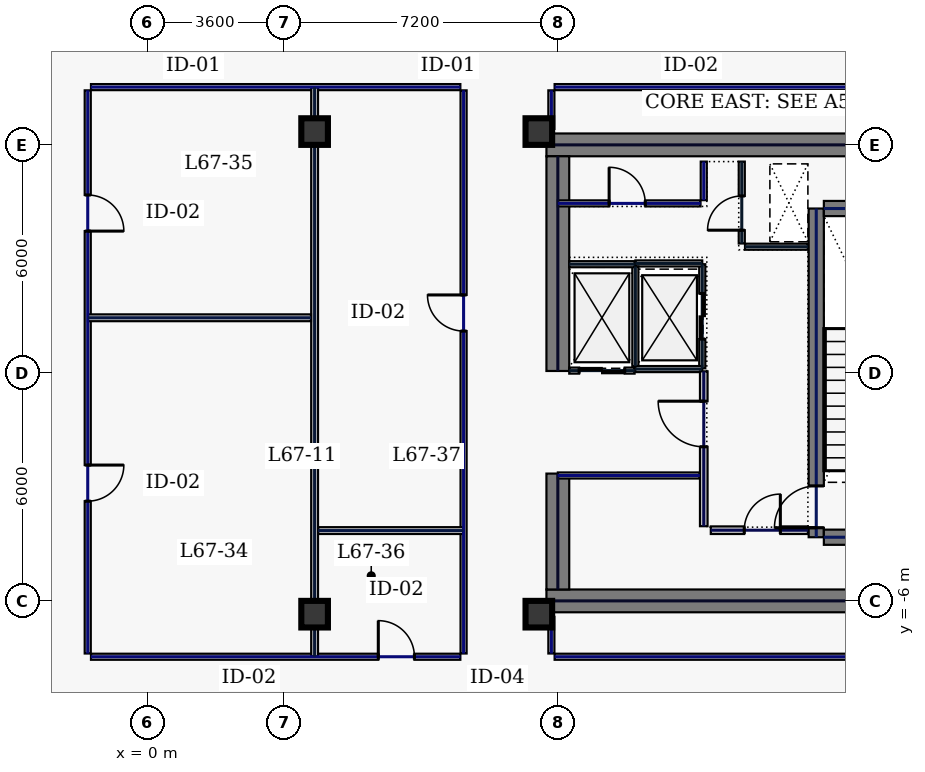
"""IFC4 building model, lengths in metres.
Left out: names, types, materials, properties, quantities, classifications, styles, units other than length and angle.
Written with IfcOpenShell. Run it as: python <this file> out.ifc"""

import sys

from ifc_helpers import new_model, si_unit, direction, frame, frame_2d, origin, origin_2d, place, context, subcontext, project, spatial, rectangle, hollow_rectangle, extrude, element, fill, save


model = new_model("IFC4")
c1 = context("Model", 3, precision=1e-05, world=origin(), true_north=direction((0.0, 1.0)))
c2 = subcontext(c1, "Body", "Model", "MODEL_VIEW")
j1 = project(units=[si_unit("LENGTHUNIT", "METRE"), si_unit("PLANEANGLEUNIT", "RADIAN")], contexts=[c1])
p1 = place(None, origin())
s1 = spatial("IfcSite", under=j1, at=p1, CompositionType="ELEMENT")
p2 = place(p1, origin())
s2 = spatial("IfcBuilding", under=s1, at=p2, CompositionType="ELEMENT")
p3 = place(p2, frame((0.0, 0.0, 289.0)))
s3 = spatial("IfcBuildingStorey", under=s2, at=p3, CompositionType="ELEMENT", Elevation=289.0)
for number, where, z_axis, x_axis in (
    (1, (10.5, 6.0, 0.0), (0.0, 0.0, 1.0), (1.0, 0.0, 0.0)),
    (2, (10.5, -6.0, 0.0), (0.0, 0.0, 1.0), (1.0, 0.0, 0.0)),
):
    element("IfcWall", number, at=place(p3, frame(where, z_axis=z_axis, x_axis=x_axis)), inside=s3, PredefinedType="SHEAR", context=c2, shape_type="SweptSolid", body=[
        extrude(rectangle(XDim=11.5, YDim=0.6, at=frame_2d((5.75, 0.0))), origin(), (0.0, 0.0, 1.0), 3.74),
    ])
p4 = place(p3, frame((10.8, -5.7, 0.0), z_axis=(0.0, 0.0, 1.0), x_axis=(0.0, 1.0, 0.0)))
e3 = element("IfcWall", 3, at=p4, inside=s3, PredefinedType="SHEAR", context=c2, shape_type="SweptSolid", body=[
    extrude(rectangle(XDim=3.05, YDim=0.6, at=frame_2d((1.525, 0.0))), origin(), (0.0, 0.0, 1.0), 3.74),
])
p5 = place(p3, frame((10.8, 0.05, 0.0), z_axis=(0.0, 0.0, 1.0), x_axis=(0.0, 1.0, 0.0)))
e4 = element("IfcWall", 4, at=p5, inside=s3, PredefinedType="SHEAR", context=c2, shape_type="SweptSolid", body=[
    extrude(rectangle(XDim=5.65, YDim=0.6, at=frame_2d((2.825, 0.0))), origin(), (0.0, 0.0, 1.0), 3.74),
])
p6 = place(p3, frame((17.6, -4.325, 0.0), z_axis=(0.0, 0.0, 1.0), x_axis=(0.0, 1.0, 0.0)))
e5 = element("IfcWall", 5, at=p6, inside=s3, PredefinedType="SHEAR", context=c2, shape_type="SweptSolid", body=[
    extrude(rectangle(XDim=8.65, YDim=0.4, at=frame_2d((4.325, 0.0))), origin(), (0.0, 0.0, 1.0), 3.74),
])
p7 = place(p6, frame((0.25, 0.0, 0.0)))
e6 = element("IfcOpeningElement", 6, at=p7, cuts=e5, PredefinedType="OPENING", context=c2, shape_type="SweptSolid", body=[
    extrude(rectangle(XDim=1.1, YDim=2.2, at=frame_2d((0.55, 1.1))), frame((0.0, 0.21, 0.0), z_axis=(0.0, -1.0, 0.0), x_axis=(1.0, 0.0, 0.0)), (0.0, 0.0, 1.0), 0.42),
])
for number, where, z_axis, x_axis in (
    (7, (17.8, -4.325, 0.0), (0.0, 0.0, 1.0), (1.0, 0.0, 0.0)),
    (8, (17.8, 4.325, 0.0), (0.0, 0.0, 1.0), (1.0, 0.0, 0.0)),
):
    element("IfcWall", number, at=place(p3, frame(where, z_axis=z_axis, x_axis=x_axis)), inside=s3, PredefinedType="SHEAR", context=c2, shape_type="SweptSolid", body=[
        extrude(rectangle(XDim=3.4, YDim=0.4, at=frame_2d((1.7, 0.0))), origin(), (0.0, 0.0, 1.0), 3.74),
    ])
for number, where, z_axis, x_axis in (
    (9, (10.3, -6.35, 0.0), (0.0, 0.0, 1.0), (1.0, 0.0, 0.0)),
    (10, (10.3, 6.35, 0.0), (0.0, 0.0, 1.0), (1.0, 0.0, 0.0)),
    (11, (4.4, -6.35, 0.0), (0.0, 0.0, 1.0), (1.0, 0.0, 0.0)),
    (12, (4.4, 6.35, 0.0), (0.0, 0.0, 1.0), (1.0, 0.0, 0.0)),
):
    element("IfcColumn", number, at=place(p3, frame(where, z_axis=z_axis, x_axis=x_axis)), inside=s3, PredefinedType="COLUMN", context=c2, shape_type="SweptSolid", body=[
        extrude(hollow_rectangle(XDim=0.7, YDim=0.7, WallThickness=0.032, at=origin_2d()), origin(), (0.0, 0.0, 1.0), 3.74),
    ])
p8 = place(p3, frame((14.6, 0.12, 0.0), z_axis=(0.0, 0.0, 1.0), x_axis=(0.0, 1.0, 0.0)))
e13 = element("IfcWall", 13, at=p8, inside=s3, PredefinedType="PARTITIONING", context=c2, shape_type="SweptSolid", body=[
    extrude(rectangle(XDim=2.74, YDim=0.16, at=frame_2d((1.37, 0.0))), origin(), (0.0, 0.0, 1.0), 3.74),
])
p9 = place(p8, frame((0.77, 0.0, 0.0)))
e14 = element("IfcOpeningElement", 14, at=p9, cuts=e13, PredefinedType="OPENING", context=c2, shape_type="SweptSolid", body=[
    extrude(rectangle(XDim=1.2, YDim=2.2, at=frame_2d((0.6, 1.1))), frame((0.0, 0.09, 0.0), z_axis=(0.0, -1.0, 0.0), x_axis=(1.0, 0.0, 0.0)), (0.0, 0.0, 1.0), 0.18),
])
for number, where, z_axis, x_axis in (
    (15, (12.84, 0.1, 0.0), (0.0, 0.0, 1.0), (1.0, 0.0, 0.0)),
    (16, (12.84, 2.88, 0.0), (0.0, 0.0, 1.0), (1.0, 0.0, 0.0)),
):
    element("IfcWall", number, at=place(p3, frame(where, z_axis=z_axis, x_axis=x_axis)), inside=s3, PredefinedType="PARTITIONING", context=c2, shape_type="SweptSolid", body=[
        extrude(rectangle(XDim=1.76, YDim=0.16, at=frame_2d((0.88, 0.0))), origin(), (0.0, 0.0, 1.0), 3.74),
    ])
p10 = place(p3, frame((12.84, 0.18, 0.0), z_axis=(0.0, 0.0, 1.0), x_axis=(0.0, 1.0, 0.0)))
e17 = element("IfcWall", 17, at=p10, inside=s3, PredefinedType="PARTITIONING", context=c2, shape_type="SweptSolid", body=[
    extrude(rectangle(XDim=2.62, YDim=0.16, at=frame_2d((1.31, 0.0))), origin(), (0.0, 0.0, 1.0), 3.74),
])
p11 = place(p3, frame((11.1, 0.06, 0.0), z_axis=(0.0, 0.0, 1.0), x_axis=(1.0, 0.0, 0.0)))
e18 = element("IfcWall", 18, at=p11, inside=s3, PredefinedType="PARTITIONING", context=c2, shape_type="SweptSolid", body=[
    extrude(rectangle(XDim=1.72, YDim=0.16, at=frame_2d((0.86, 0.0))), origin(), (0.0, 0.0, 1.0), 3.74),
])
p12 = place(p11, frame((0.26, 0.0, 0.0)))
e19 = element("IfcOpeningElement", 19, at=p12, cuts=e18, PredefinedType="OPENING", context=c2, shape_type="SweptSolid", body=[
    extrude(rectangle(XDim=1.2, YDim=2.2, at=frame_2d((0.6, 1.1))), frame((0.0, 0.09, 0.0), z_axis=(0.0, -1.0, 0.0), x_axis=(1.0, 0.0, 0.0)), (0.0, 0.0, 1.0), 0.18),
])
p13 = place(p3, frame((11.1, 2.86, 0.0), z_axis=(0.0, 0.0, 1.0), x_axis=(1.0, 0.0, 0.0)))
e20 = element("IfcWall", 20, at=p13, inside=s3, PredefinedType="PARTITIONING", context=c2, shape_type="SweptSolid", body=[
    extrude(rectangle(XDim=1.72, YDim=0.16, at=frame_2d((0.86, 0.0))), origin(), (0.0, 0.0, 1.0), 3.74),
])
p14 = place(p3, frame((15.64, 3.405, 0.0), z_axis=(0.0, 0.0, 1.0), x_axis=(0.0, 1.0, 0.0)))
e21 = element("IfcWall", 21, at=p14, inside=s3, PredefinedType="PARTITIONING", context=c2, shape_type="SweptSolid", body=[
    extrude(rectangle(XDim=2.155, YDim=0.16, at=frame_2d((1.078, 0.0))), origin(), (0.0, 0.0, 1.0), 3.74),
])
p15 = place(p14, frame((0.35, 0.0, 0.0)))
e22 = element("IfcOpeningElement", 22, at=p15, cuts=e21, PredefinedType="OPENING", context=c2, shape_type="SweptSolid", body=[
    extrude(rectangle(XDim=0.9, YDim=2.2, at=frame_2d((0.45, 1.1))), frame((0.0, 0.09, 0.0), z_axis=(0.0, -1.0, 0.0), x_axis=(1.0, 0.0, 0.0)), (0.0, 0.0, 1.0), 0.18),
])
p16 = place(p3, frame((15.725, 3.32, 0.0), z_axis=(0.0, 0.0, 1.0), x_axis=(1.0, 0.0, 0.0)))
e23 = element("IfcWall", 23, at=p16, inside=s3, PredefinedType="PARTITIONING", context=c2, shape_type="SweptSolid", body=[
    extrude(rectangle(XDim=1.655, YDim=0.16, at=frame_2d((0.827, 0.0))), origin(), (0.0, 0.0, 1.0), 3.74),
])
p17 = place(p3, frame((14.825, -4.14, 0.0), z_axis=(0.0, 0.0, 1.0), x_axis=(1.0, 0.0, 0.0)))
e24 = element("IfcWall", 24, at=p17, inside=s3, PredefinedType="SOLIDWALL", context=c2, shape_type="SweptSolid", body=[
    extrude(rectangle(XDim=2.555, YDim=0.2, at=frame_2d((1.277, 0.0))), origin(), (0.0, 0.0, 1.0), 3.74),
])
p18 = place(p17, frame((0.88, 0.0, 0.0)))
e25 = element("IfcOpeningElement", 25, at=p18, cuts=e24, PredefinedType="OPENING", context=c2, shape_type="SweptSolid", body=[
    extrude(rectangle(XDim=0.95, YDim=2.2, at=frame_2d((0.475, 1.1))), frame((0.0, 0.11, 0.0), z_axis=(0.0, -1.0, 0.0), x_axis=(1.0, 0.0, 0.0)), (0.0, 0.0, 1.0), 0.22),
])
p19 = place(p3, frame((10.8, -2.7, 0.0), z_axis=(0.0, 0.0, 1.0), x_axis=(1.0, 0.0, 0.0)))
e26 = element("IfcWall", 26, at=p19, inside=s3, PredefinedType="PARTITIONING", context=c2, shape_type="SweptSolid", body=[
    extrude(rectangle(XDim=3.735, YDim=0.16, at=frame_2d((1.867, 0.0))), origin(), (0.0, 0.0, 1.0), 3.74),
])
p20 = place(p3, frame((10.8, 4.46, 0.0), z_axis=(0.0, 0.0, 1.0), x_axis=(1.0, 0.0, 0.0)))
e27 = element("IfcWall", 27, at=p20, inside=s3, PredefinedType="PARTITIONING", context=c2, shape_type="SweptSolid", body=[
    extrude(rectangle(XDim=3.755, YDim=0.16, at=frame_2d((1.877, 0.0))), origin(), (0.0, 0.0, 1.0), 3.74),
])
p21 = place(p20, frame((1.35, 0.0, 0.0)))
e28 = element("IfcOpeningElement", 28, at=p21, cuts=e27, PredefinedType="OPENING", context=c2, shape_type="SweptSolid", body=[
    extrude(rectangle(XDim=0.95, YDim=2.2, at=frame_2d((0.475, 1.1))), frame((0.0, 0.09, 0.0), z_axis=(0.0, -1.0, 0.0), x_axis=(1.0, 0.0, 0.0)), (0.0, 0.0, 1.0), 0.18),
])
p22 = place(p3, frame((14.64, 4.545, 0.0), z_axis=(0.0, 0.0, 1.0), x_axis=(0.0, 1.0, 0.0)))
e29 = element("IfcWall", 29, at=p22, inside=s3, PredefinedType="PARTITIONING", context=c2, shape_type="SweptSolid", body=[
    extrude(rectangle(XDim=1.015, YDim=0.16, at=frame_2d((0.508, 0.0))), origin(), (0.0, 0.0, 1.0), 3.74),
])
p23 = place(p3, frame((14.64, -4.035, 0.0), z_axis=(0.0, 0.0, 1.0), x_axis=(0.0, 1.0, 0.0)))
e30 = element("IfcWall", 30, at=p23, inside=s3, PredefinedType="SOLIDWALL", context=c2, shape_type="SweptSolid", body=[
    extrude(rectangle(XDim=4.075, YDim=0.2, at=frame_2d((2.038, 0.0))), origin(), (0.0, 0.0, 1.0), 3.74),
])
p24 = place(p23, frame((2.09, 0.0, 0.0)))
e31 = element("IfcOpeningElement", 31, at=p24, cuts=e30, PredefinedType="OPENING", context=c2, shape_type="SweptSolid", body=[
    extrude(rectangle(XDim=1.2, YDim=2.2, at=frame_2d((0.6, 1.1))), frame((0.0, 0.11, 0.0), z_axis=(0.0, -1.0, 0.0), x_axis=(1.0, 0.0, 0.0)), (0.0, 0.0, 1.0), 0.22),
])
p25 = place(p3, frame((21.915, 7.52, 0.0), z_axis=(0.0, 0.0, 1.0), x_axis=(-1.0, 0.0, 0.0)))
e32 = element("IfcWall", 32, at=p25, inside=s3, PredefinedType="PARTITIONING", context=c2, shape_type="SweptSolid", body=[
    extrude(rectangle(XDim=11.2, YDim=0.16, at=frame_2d((5.6, 0.0))), origin(), (0.0, 0.0, 1.0), 3.74),
])
p26 = place(p3, frame((10.63, 7.435, 0.0), z_axis=(0.0, 0.0, 1.0), x_axis=(0.0, -1.0, 0.0)))
e33 = element("IfcWall", 33, at=p26, inside=s3, PredefinedType="PARTITIONING", context=c2, shape_type="SweptSolid", body=[
    extrude(rectangle(XDim=1.015, YDim=0.16, at=frame_2d((0.508, 0.0))), origin(), (0.0, 0.0, 1.0), 3.74),
])
p27 = place(p3, frame((10.63, -6.42, 0.0), z_axis=(0.0, 0.0, 1.0), x_axis=(0.0, -1.0, 0.0)))
e34 = element("IfcWall", 34, at=p27, inside=s3, PredefinedType="PARTITIONING", context=c2, shape_type="SweptSolid", body=[
    extrude(rectangle(XDim=0.965, YDim=0.16, at=frame_2d((0.482, 0.0))), origin(), (0.0, 0.0, 1.0), 3.74),
])
p28 = place(p3, frame((10.715, -7.47, 0.0), z_axis=(0.0, 0.0, 1.0), x_axis=(1.0, 0.0, 0.0)))
e35 = element("IfcWall", 35, at=p28, inside=s3, PredefinedType="PARTITIONING", context=c2, shape_type="SweptSolid", body=[
    extrude(rectangle(XDim=11.2, YDim=0.16, at=frame_2d((5.6, 0.0))), origin(), (0.0, 0.0, 1.0), 3.74),
])
p29 = place(p3, frame((8.235, 7.52, 0.0), z_axis=(0.0, 0.0, 1.0), x_axis=(-1.0, 0.0, 0.0)))
e36 = element("IfcWall", 36, at=p29, inside=s3, PredefinedType="PARTITIONING", context=c2, shape_type="SweptSolid", body=[
    extrude(rectangle(XDim=9.72, YDim=0.16, at=frame_2d((4.86, 0.0))), origin(), (0.0, 0.0, 1.0), 3.74),
])
p30 = place(p3, frame((-1.57, 7.435, 0.0), z_axis=(0.0, 0.0, 1.0), x_axis=(0.0, -1.0, 0.0)))
e37 = element("IfcWall", 37, at=p30, inside=s3, PredefinedType="PARTITIONING", context=c2, shape_type="SweptSolid", body=[
    extrude(rectangle(XDim=14.82, YDim=0.16, at=frame_2d((7.41, 0.0))), origin(), (0.0, 0.0, 1.0), 3.74),
])
p31 = place(p30, frame((9.861, 0.0, 0.0)))
e38 = element("IfcOpeningElement", 38, at=p31, cuts=e37, PredefinedType="OPENING", context=c2, shape_type="SweptSolid", body=[
    extrude(rectangle(XDim=0.95, YDim=2.2, at=frame_2d((0.475, 1.1))), frame((0.0, 0.09, 0.0), z_axis=(0.0, -1.0, 0.0), x_axis=(1.0, 0.0, 0.0)), (0.0, 0.0, 1.0), 0.18),
])
p32 = place(p30, frame((2.754, 0.0, 0.0)))
e39 = element("IfcOpeningElement", 39, at=p32, cuts=e37, PredefinedType="OPENING", context=c2, shape_type="SweptSolid", body=[
    extrude(rectangle(XDim=0.95, YDim=2.2, at=frame_2d((0.475, 1.1))), frame((0.0, 0.09, 0.0), z_axis=(0.0, -1.0, 0.0), x_axis=(1.0, 0.0, 0.0)), (0.0, 0.0, 1.0), 0.18),
])
p33 = place(p3, frame((-1.485, -7.47, 0.0), z_axis=(0.0, 0.0, 1.0), x_axis=(1.0, 0.0, 0.0)))
e40 = element("IfcWall", 40, at=p33, inside=s3, PredefinedType="PARTITIONING", context=c2, shape_type="SweptSolid", body=[
    extrude(rectangle(XDim=9.72, YDim=0.16, at=frame_2d((4.86, 0.0))), origin(), (0.0, 0.0, 1.0), 3.74),
])
p34 = place(p33, frame((7.561, 0.0, 0.0)))
e41 = element("IfcOpeningElement", 41, at=p34, cuts=e40, PredefinedType="OPENING", context=c2, shape_type="SweptSolid", body=[
    extrude(rectangle(XDim=0.95, YDim=2.2, at=frame_2d((0.475, 1.1))), frame((0.0, 0.09, 0.0), z_axis=(0.0, -1.0, 0.0), x_axis=(1.0, 0.0, 0.0)), (0.0, 0.0, 1.0), 0.18),
])
p35 = place(p3, frame((8.32, -7.385, 0.0), z_axis=(0.0, 0.0, 1.0), x_axis=(0.0, 1.0, 0.0)))
e42 = element("IfcWall", 42, at=p35, inside=s3, PredefinedType="PARTITIONING", context=c2, shape_type="SweptSolid", body=[
    extrude(rectangle(XDim=14.82, YDim=0.16, at=frame_2d((7.41, 0.0))), origin(), (0.0, 0.0, 1.0), 3.74),
])
p36 = place(p35, frame((8.486, 0.0, 0.0)))
e43 = element("IfcOpeningElement", 43, at=p36, cuts=e42, PredefinedType="OPENING", context=c2, shape_type="SweptSolid", body=[
    extrude(rectangle(XDim=0.95, YDim=2.2, at=frame_2d((0.475, 1.1))), frame((0.0, 0.09, 0.0), z_axis=(0.0, -1.0, 0.0), x_axis=(1.0, 0.0, 0.0)), (0.0, 0.0, 1.0), 0.18),
])
p37 = place(p3, frame((4.4, -7.465, 0.0), z_axis=(0.0, 0.0, 1.0), x_axis=(0.0, 1.0, 0.0)))
e44 = element("IfcWall", 44, at=p37, inside=s3, PredefinedType="PARTITIONING", context=c2, shape_type="SweptSolid", body=[
    extrude(rectangle(XDim=14.98, YDim=0.18, at=frame_2d((7.49, 0.0))), origin(), (0.0, 0.0, 1.0), 3.035),
])
p38 = place(p3, frame((-1.565, 1.45, 0.0), z_axis=(0.0, 0.0, 1.0), x_axis=(1.0, 0.0, 0.0)))
e45 = element("IfcWall", 45, at=p38, inside=s3, PredefinedType="PARTITIONING", context=c2, shape_type="SweptSolid", body=[
    extrude(rectangle(XDim=5.87, YDim=0.18, at=frame_2d((2.935, 0.0))), origin(), (0.0, 0.0, 1.0), 3.74),
])
p39 = place(p3, frame((4.495, -4.15, 0.0), z_axis=(0.0, 0.0, 1.0), x_axis=(1.0, 0.0, 0.0)))
e46 = element("IfcWall", 46, at=p39, inside=s3, PredefinedType="PARTITIONING", context=c2, shape_type="SweptSolid", body=[
    extrude(rectangle(XDim=3.82, YDim=0.18, at=frame_2d((1.91, 0.0))), origin(), (0.0, 0.0, 1.0), 3.74),
])
p40 = place(p7, origin())
e47 = element("IfcDoor", 47, at=p40, inside=s3, OperationType="SINGLE_SWING_LEFT", PredefinedType="DOOR", context=c2, shape_type="SweptSolid", body=[
    extrude(rectangle(XDim=1.1, YDim=2.2, at=frame_2d((0.55, 1.1))), frame((0.0, 0.025, 0.0), z_axis=(0.0, -1.0, 0.0), x_axis=(1.0, 0.0, 0.0)), (0.0, 0.0, 1.0), 0.05),
])
fill(e6, e47)
p41 = place(p9, origin())
e48 = element("IfcDoor", 48, at=p41, inside=s3, OperationType="SLIDING_TO_LEFT", PredefinedType="DOOR", context=c2, shape_type="SweptSolid", body=[
    extrude(rectangle(XDim=1.2, YDim=2.2, at=frame_2d((0.6, 1.1))), frame((0.0, 0.025, 0.0), z_axis=(0.0, -1.0, 0.0), x_axis=(1.0, 0.0, 0.0)), (0.0, 0.0, 1.0), 0.05),
])
fill(e14, e48)
p42 = place(p12, origin())
e49 = element("IfcDoor", 49, at=p42, inside=s3, OperationType="SLIDING_TO_LEFT", PredefinedType="DOOR", context=c2, shape_type="SweptSolid", body=[
    extrude(rectangle(XDim=1.2, YDim=2.2, at=frame_2d((0.6, 1.1))), frame((0.0, 0.025, 0.0), z_axis=(0.0, -1.0, 0.0), x_axis=(1.0, 0.0, 0.0)), (0.0, 0.0, 1.0), 0.05),
])
fill(e19, e49)
p43 = place(p15, origin())
e50 = element("IfcDoor", 50, at=p43, inside=s3, OperationType="SINGLE_SWING_LEFT", PredefinedType="DOOR", context=c2, shape_type="SweptSolid", body=[
    extrude(rectangle(XDim=0.9, YDim=2.2, at=frame_2d((0.45, 1.1))), frame((0.0, 0.025, 0.0), z_axis=(0.0, -1.0, 0.0), x_axis=(1.0, 0.0, 0.0)), (0.0, 0.0, 1.0), 0.05),
])
fill(e22, e50)
p44 = place(p18, origin())
e51 = element("IfcDoor", 51, at=p44, inside=s3, OperationType="SINGLE_SWING_RIGHT", PredefinedType="DOOR", context=c2, shape_type="SweptSolid", body=[
    extrude(rectangle(XDim=0.95, YDim=2.2, at=frame_2d((0.475, 1.1))), frame((0.0, 0.025, 0.0), z_axis=(0.0, -1.0, 0.0), x_axis=(1.0, 0.0, 0.0)), (0.0, 0.0, 1.0), 0.05),
])
fill(e25, e51)
p45 = place(p21, origin())
e52 = element("IfcDoor", 52, at=p45, inside=s3, OperationType="SINGLE_SWING_LEFT", PredefinedType="DOOR", context=c2, shape_type="SweptSolid", body=[
    extrude(rectangle(XDim=0.95, YDim=2.2, at=frame_2d((0.475, 1.1))), frame((0.0, 0.025, 0.0), z_axis=(0.0, -1.0, 0.0), x_axis=(1.0, 0.0, 0.0)), (0.0, 0.0, 1.0), 0.05),
])
fill(e28, e52)
p46 = place(p24, origin())
e53 = element("IfcDoor", 53, at=p46, inside=s3, OperationType="SINGLE_SWING_RIGHT", PredefinedType="DOOR", context=c2, shape_type="SweptSolid", body=[
    extrude(rectangle(XDim=1.2, YDim=2.2, at=frame_2d((0.6, 1.1))), frame((0.0, 0.025, 0.0), z_axis=(0.0, -1.0, 0.0), x_axis=(1.0, 0.0, 0.0)), (0.0, 0.0, 1.0), 0.05),
])
fill(e31, e53)
p47 = place(p31, origin())
e54 = element("IfcDoor", 54, at=p47, inside=s3, OperationType="SINGLE_SWING_LEFT", PredefinedType="DOOR", context=c2, shape_type="SweptSolid", body=[
    extrude(rectangle(XDim=0.95, YDim=2.2, at=frame_2d((0.475, 1.1))), frame((0.0, 0.025, 0.0), z_axis=(0.0, -1.0, 0.0), x_axis=(1.0, 0.0, 0.0)), (0.0, 0.0, 1.0), 0.05),
])
fill(e38, e54)
p48 = place(p32, origin())
e55 = element("IfcDoor", 55, at=p48, inside=s3, OperationType="SINGLE_SWING_RIGHT", PredefinedType="DOOR", context=c2, shape_type="SweptSolid", body=[
    extrude(rectangle(XDim=0.95, YDim=2.2, at=frame_2d((0.475, 1.1))), frame((0.0, 0.025, 0.0), z_axis=(0.0, -1.0, 0.0), x_axis=(1.0, 0.0, 0.0)), (0.0, 0.0, 1.0), 0.05),
])
fill(e39, e55)
p49 = place(p34, origin())
e56 = element("IfcDoor", 56, at=p49, inside=s3, OperationType="SINGLE_SWING_LEFT", PredefinedType="DOOR", context=c2, shape_type="SweptSolid", body=[
    extrude(rectangle(XDim=0.95, YDim=2.2, at=frame_2d((0.475, 1.1))), frame((0.0, 0.025, 0.0), z_axis=(0.0, -1.0, 0.0), x_axis=(1.0, 0.0, 0.0)), (0.0, 0.0, 1.0), 0.05),
])
fill(e41, e56)
p50 = place(p36, origin())
e57 = element("IfcDoor", 57, at=p50, inside=s3, OperationType="SINGLE_SWING_RIGHT", PredefinedType="DOOR", context=c2, shape_type="SweptSolid", body=[
    extrude(rectangle(XDim=0.95, YDim=2.2, at=frame_2d((0.475, 1.1))), frame((0.0, 0.025, 0.0), z_axis=(0.0, -1.0, 0.0), x_axis=(1.0, 0.0, 0.0)), (0.0, 0.0, 1.0), 0.05),
])
fill(e43, e57)
save(model, sys.argv[1])
